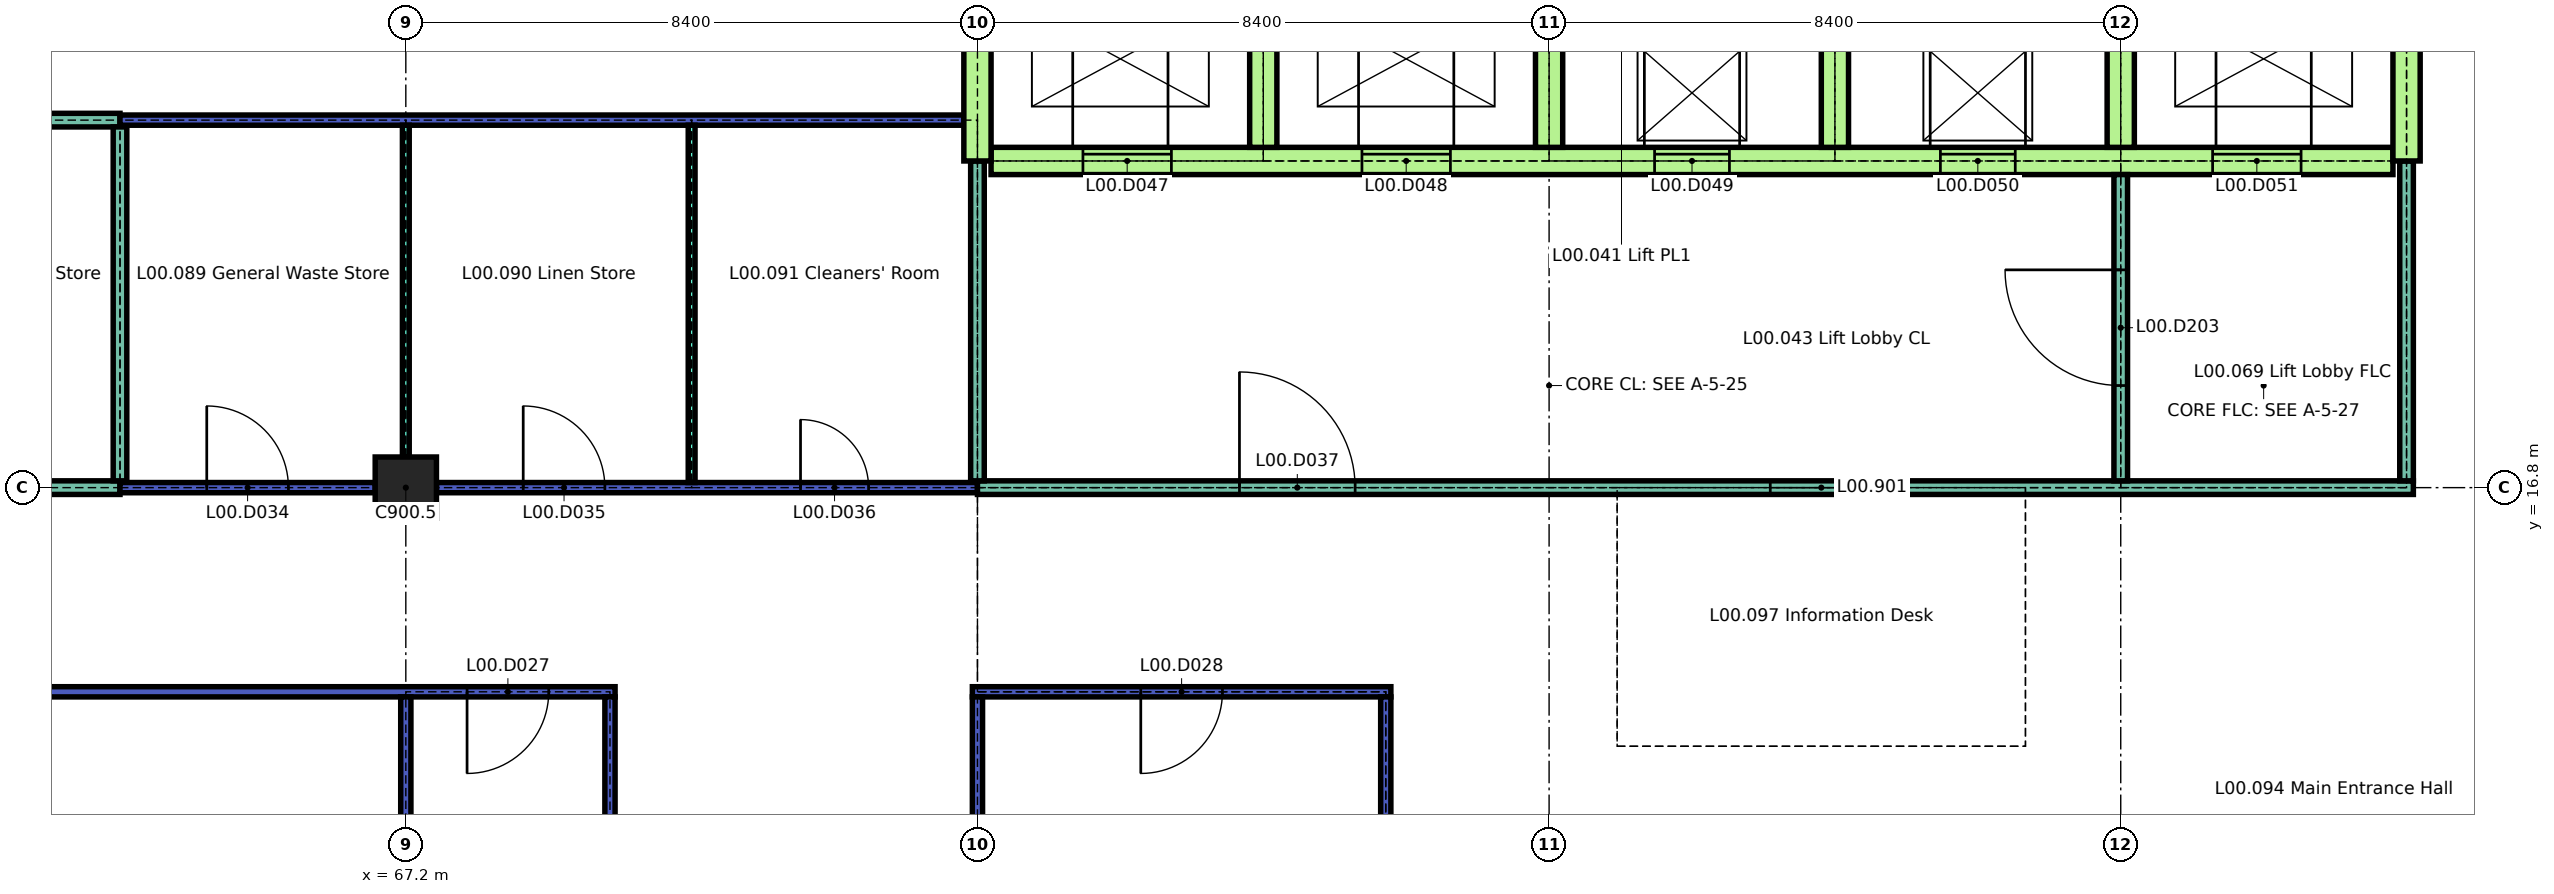
"""IFC4 building model, lengths in metres.
Left out: names, types, materials, properties, quantities, classifications, styles, units other than length and angle.
Written with IfcOpenShell. Run it as: python <this file> out.ifc"""

import sys

from ifc_helpers import new_model, si_unit, direction, frame, frame_2d, origin, origin_2d, place, context, subcontext, project, spatial, rectangle, extrude, element, fill, save


model = new_model("IFC4")
c1 = context("Model", 3, precision=1e-05, world=origin(), true_north=direction((0.0, 1.0)))
c2 = subcontext(c1, "Body", "Model", "MODEL_VIEW")
j1 = project(units=[si_unit("LENGTHUNIT", "METRE"), si_unit("PLANEANGLEUNIT", "RADIAN")], contexts=[c1])
p1 = place(None, origin())
s1 = spatial("IfcSite", under=j1, at=p1, CompositionType="ELEMENT")
p2 = place(p1, origin())
s2 = spatial("IfcBuilding", under=s1, at=p2, CompositionType="ELEMENT")
p3 = place(p2, origin())
s3 = spatial("IfcBuildingStorey", under=s2, at=p3, CompositionType="ELEMENT", Elevation=0.0)
p4 = place(p3, frame((67.2, 16.8, 0.0), z_axis=(0.0, 0.0, 1.0), x_axis=(1.0, 0.0, 0.0)))
e1 = element("IfcColumn", 1, at=p4, inside=s3, PredefinedType="COLUMN", context=c2, shape_type="SweptSolid", body=[
    extrude(rectangle(XDim=0.9, YDim=0.9, at=origin_2d()), origin(), (0.0, 0.0, 1.0), 4.14),
])
p5 = place(p3, frame((41.925, 13.8, 0.0), z_axis=(0.0, 0.0, 1.0), x_axis=(1.0, 0.0, 0.0)))
e2 = element("IfcWall", 2, at=p5, inside=s3, PredefinedType="PARTITIONING", context=c2, shape_type="SweptSolid", body=[
    extrude(rectangle(XDim=28.35, YDim=0.15, at=frame_2d((14.175, 0.0))), origin(), (0.0, 0.0, 1.0), 4.14),
])
p6 = place(p5, frame((11.475, 0.0, 0.0)))
e3 = element("IfcOpeningElement", 3, at=p6, cuts=e2, PredefinedType="OPENING", context=c2, shape_type="SweptSolid", body=[
    extrude(rectangle(XDim=2.4, YDim=2.4, at=frame_2d((1.2, 1.2))), frame((0.0, 0.085, 0.0), z_axis=(0.0, -1.0, 0.0), x_axis=(1.0, 0.0, 0.0)), (0.0, 0.0, 1.0), 0.17),
])
p7 = place(p5, frame((26.175, 0.0, 0.0)))
e4 = element("IfcOpeningElement", 4, at=p7, cuts=e2, PredefinedType="OPENING", context=c2, shape_type="SweptSolid", body=[
    extrude(rectangle(XDim=1.2, YDim=2.1, at=frame_2d((0.6, 1.05))), frame((0.0, 0.085, 0.0), z_axis=(0.0, -1.0, 0.0), x_axis=(1.0, 0.0, 0.0)), (0.0, 0.0, 1.0), 0.17),
])
p8 = place(p3, frame((75.525, 13.8, 0.0), z_axis=(0.0, 0.0, 1.0), x_axis=(1.0, 0.0, 0.0)))
e5 = element("IfcWall", 5, at=p8, inside=s3, PredefinedType="PARTITIONING", context=c2, shape_type="SweptSolid", body=[
    extrude(rectangle(XDim=6.15, YDim=0.15, at=frame_2d((3.075, 0.0))), origin(), (0.0, 0.0, 1.0), 4.14),
])
p9 = place(p8, frame((2.475, 0.0, 0.0)))
e6 = element("IfcOpeningElement", 6, at=p9, cuts=e5, PredefinedType="OPENING", context=c2, shape_type="SweptSolid", body=[
    extrude(rectangle(XDim=1.2, YDim=2.1, at=frame_2d((0.6, 1.05))), frame((0.0, 0.085, 0.0), z_axis=(0.0, -1.0, 0.0), x_axis=(1.0, 0.0, 0.0)), (0.0, 0.0, 1.0), 0.17),
])
p10 = place(p3, frame((59.25, 16.8, 0.0), z_axis=(0.0, 0.0, 1.0), x_axis=(1.0, 0.0, 0.0)))
e7 = element("IfcWall", 7, at=p10, inside=s3, PredefinedType="PARTITIONING", context=c2, shape_type="SweptSolid", body=[
    extrude(rectangle(XDim=3.75, YDim=0.2, at=frame_2d((1.875, 0.0))), origin(), (0.0, 0.0, 1.0), 4.14),
])
p11 = place(p10, frame((1.275, 0.0, 0.0)))
e8 = element("IfcOpeningElement", 8, at=p11, cuts=e7, PredefinedType="OPENING", context=c2, shape_type="SweptSolid", body=[
    extrude(rectangle(XDim=1.2, YDim=2.1, at=frame_2d((0.6, 1.05))), frame((0.0, 0.11, 0.0), z_axis=(0.0, -1.0, 0.0), x_axis=(1.0, 0.0, 0.0)), (0.0, 0.0, 1.0), 0.22),
])
p12 = place(p3, frame((63.0, 16.8, 0.0), z_axis=(0.0, 0.0, 1.0), x_axis=(1.0, 0.0, 0.0)))
e9 = element("IfcWall", 9, at=p12, inside=s3, PredefinedType="PARTITIONING", context=c2, shape_type="SweptSolid", body=[
    extrude(rectangle(XDim=3.75, YDim=0.15, at=frame_2d((1.875, 0.0))), origin(), (0.0, 0.0, 1.0), 4.14),
])
p13 = place(p12, frame((1.275, 0.0, 0.0)))
e10 = element("IfcOpeningElement", 10, at=p13, cuts=e9, PredefinedType="OPENING", context=c2, shape_type="SweptSolid", body=[
    extrude(rectangle(XDim=1.2, YDim=2.1, at=frame_2d((0.6, 1.05))), frame((0.0, 0.085, 0.0), z_axis=(0.0, -1.0, 0.0), x_axis=(1.0, 0.0, 0.0)), (0.0, 0.0, 1.0), 0.17),
])
p14 = place(p3, frame((67.65, 16.8, 0.0), z_axis=(0.0, 0.0, 1.0), x_axis=(1.0, 0.0, 0.0)))
e11 = element("IfcWall", 11, at=p14, inside=s3, PredefinedType="PARTITIONING", context=c2, shape_type="SweptSolid", body=[
    extrude(rectangle(XDim=7.95, YDim=0.15, at=frame_2d((3.975, 0.0))), origin(), (0.0, 0.0, 1.0), 4.14),
])
p15 = place(p14, frame((1.275, 0.0, 0.0)))
e12 = element("IfcOpeningElement", 12, at=p15, cuts=e11, PredefinedType="OPENING", context=c2, shape_type="SweptSolid", body=[
    extrude(rectangle(XDim=1.2, YDim=2.1, at=frame_2d((0.6, 1.05))), frame((0.0, 0.085, 0.0), z_axis=(0.0, -1.0, 0.0), x_axis=(1.0, 0.0, 0.0)), (0.0, 0.0, 1.0), 0.17),
])
p16 = place(p14, frame((5.35, 0.0, 0.0)))
e13 = element("IfcOpeningElement", 13, at=p16, cuts=e11, PredefinedType="OPENING", context=c2, shape_type="SweptSolid", body=[
    extrude(rectangle(XDim=1.0, YDim=2.1, at=frame_2d((0.5, 1.05))), frame((0.0, 0.085, 0.0), z_axis=(0.0, -1.0, 0.0), x_axis=(1.0, 0.0, 0.0)), (0.0, 0.0, 1.0), 0.17),
])
p17 = place(p3, frame((75.6, 16.8, 0.0), z_axis=(0.0, 0.0, 1.0), x_axis=(1.0, 0.0, 0.0)))
e14 = element("IfcWall", 14, at=p17, inside=s3, PredefinedType="PARTITIONING", context=c2, shape_type="SweptSolid", body=[
    extrude(rectangle(XDim=21.1, YDim=0.2, at=frame_2d((10.55, 0.0))), origin(), (0.0, 0.0, 1.0), 4.14),
])
p18 = place(p17, frame((3.85, 0.0, 0.0)))
e15 = element("IfcOpeningElement", 15, at=p18, cuts=e14, PredefinedType="OPENING", context=c2, shape_type="SweptSolid", body=[
    extrude(rectangle(XDim=1.7, YDim=2.4, at=frame_2d((0.85, 1.2))), frame((0.0, 0.11, 0.0), z_axis=(0.0, -1.0, 0.0), x_axis=(1.0, 0.0, 0.0)), (0.0, 0.0, 1.0), 0.22),
])
p19 = place(p17, frame((11.65, 0.0, 0.9)))
e16 = element("IfcOpeningElement", 16, at=p19, cuts=e14, PredefinedType="OPENING", context=c2, shape_type="SweptSolid", body=[
    extrude(rectangle(XDim=1.5, YDim=1.0, at=frame_2d((0.75, 0.5))), frame((0.0, 0.11, 0.0), z_axis=(0.0, -1.0, 0.0), x_axis=(1.0, 0.0, 0.0)), (0.0, 0.0, 1.0), 0.22),
])
p20 = place(p3, frame((75.8, 21.6, 0.0), z_axis=(0.0, 0.0, 1.0), x_axis=(1.0, 0.0, 0.0)))
e17 = element("IfcWall", 17, at=p20, inside=s3, PredefinedType="SHEAR", context=c2, shape_type="SweptSolid", body=[
    extrude(rectangle(XDim=20.6, YDim=0.4, at=frame_2d((10.3, 0.0))), origin(), (0.0, 0.0, 1.0), 4.14),
])
p21 = place(p20, frame((1.35, 0.0, 0.0)))
e18 = element("IfcOpeningElement", 18, at=p21, cuts=e17, PredefinedType="OPENING", context=c2, shape_type="SweptSolid", body=[
    extrude(rectangle(XDim=1.3, YDim=2.1, at=frame_2d((0.65, 1.05))), frame((0.0, 0.21, 0.0), z_axis=(0.0, -1.0, 0.0), x_axis=(1.0, 0.0, 0.0)), (0.0, 0.0, 1.0), 0.42),
])
p22 = place(p20, frame((5.45, 0.0, 0.0)))
e19 = element("IfcOpeningElement", 19, at=p22, cuts=e17, PredefinedType="OPENING", context=c2, shape_type="SweptSolid", body=[
    extrude(rectangle(XDim=1.3, YDim=2.1, at=frame_2d((0.65, 1.05))), frame((0.0, 0.21, 0.0), z_axis=(0.0, -1.0, 0.0), x_axis=(1.0, 0.0, 0.0)), (0.0, 0.0, 1.0), 0.42),
])
p23 = place(p20, frame((9.75, 0.0, 0.0)))
e20 = element("IfcOpeningElement", 20, at=p23, cuts=e17, PredefinedType="OPENING", context=c2, shape_type="SweptSolid", body=[
    extrude(rectangle(XDim=1.1, YDim=2.1, at=frame_2d((0.55, 1.05))), frame((0.0, 0.21, 0.0), z_axis=(0.0, -1.0, 0.0), x_axis=(1.0, 0.0, 0.0)), (0.0, 0.0, 1.0), 0.42),
])
p24 = place(p20, frame((13.95, 0.0, 0.0)))
e21 = element("IfcOpeningElement", 21, at=p24, cuts=e17, PredefinedType="OPENING", context=c2, shape_type="SweptSolid", body=[
    extrude(rectangle(XDim=1.1, YDim=2.1, at=frame_2d((0.55, 1.05))), frame((0.0, 0.21, 0.0), z_axis=(0.0, -1.0, 0.0), x_axis=(1.0, 0.0, 0.0)), (0.0, 0.0, 1.0), 0.42),
])
p25 = place(p20, frame((17.95, 0.0, 0.0)))
e22 = element("IfcOpeningElement", 22, at=p25, cuts=e17, PredefinedType="OPENING", context=c2, shape_type="SweptSolid", body=[
    extrude(rectangle(XDim=1.3, YDim=2.1, at=frame_2d((0.65, 1.05))), frame((0.0, 0.21, 0.0), z_axis=(0.0, -1.0, 0.0), x_axis=(1.0, 0.0, 0.0)), (0.0, 0.0, 1.0), 0.42),
])
p26 = place(p3, frame((58.8, 22.2, 0.0), z_axis=(0.0, 0.0, 1.0), x_axis=(1.0, 0.0, 0.0)))
e23 = element("IfcWall", 23, at=p26, inside=s3, PredefinedType="PARTITIONING", context=c2, shape_type="SweptSolid", body=[
    extrude(rectangle(XDim=4.2, YDim=0.2, at=frame_2d((2.1, 0.0))), origin(), (0.0, 0.0, 1.0), 4.14),
])
p27 = place(p3, frame((63.0, 22.2, 0.0), z_axis=(0.0, 0.0, 1.0), x_axis=(1.0, 0.0, 0.0)))
e24 = element("IfcWall", 24, at=p27, inside=s3, PredefinedType="PARTITIONING", context=c2, shape_type="SweptSolid", body=[
    extrude(rectangle(XDim=12.4, YDim=0.15, at=frame_2d((6.2, 0.0))), origin(), (0.0, 0.0, 1.0), 4.14),
])
p28 = place(p3, frame((63.0, 16.9, 0.0), z_axis=(0.0, 0.0, 1.0), x_axis=(0.0, 1.0, 0.0)))
e25 = element("IfcWall", 25, at=p28, inside=s3, PredefinedType="PARTITIONING", context=c2, shape_type="SweptSolid", body=[
    extrude(rectangle(XDim=5.2, YDim=0.2, at=frame_2d((2.6, 0.0))), origin(), (0.0, 0.0, 1.0), 4.14),
])
p29 = place(p3, frame((67.2, 8.4, 0.0), z_axis=(0.0, 0.0, 1.0), x_axis=(0.0, 1.0, 0.0)))
e26 = element("IfcWall", 26, at=p29, inside=s3, PredefinedType="PARTITIONING", context=c2, shape_type="SweptSolid", body=[
    extrude(rectangle(XDim=5.325, YDim=0.15, at=frame_2d((2.663, 0.0))), origin(), (0.0, 0.0, 1.0), 4.14),
])
p30 = place(p3, frame((67.2, 17.25, 0.0), z_axis=(0.0, 0.0, 1.0), x_axis=(0.0, 1.0, 0.0)))
e27 = element("IfcWall", 27, at=p30, inside=s3, PredefinedType="PARTITIONING", context=c2, shape_type="SweptSolid", body=[
    extrude(rectangle(XDim=4.875, YDim=0.1, at=frame_2d((2.438, 0.0))), origin(), (0.0, 0.0, 1.0), 4.14),
])
p31 = place(p3, frame((70.2, 8.5, 0.0), z_axis=(0.0, 0.0, 1.0), x_axis=(0.0, 1.0, 0.0)))
e28 = element("IfcWall", 28, at=p31, inside=s3, PredefinedType="PARTITIONING", context=c2, shape_type="SweptSolid", body=[
    extrude(rectangle(XDim=5.225, YDim=0.15, at=frame_2d((2.613, 0.0))), origin(), (0.0, 0.0, 1.0), 4.14),
])
p32 = place(p3, frame((71.4, 16.875, 0.0), z_axis=(0.0, 0.0, 1.0), x_axis=(0.0, 1.0, 0.0)))
e29 = element("IfcWall", 29, at=p32, inside=s3, PredefinedType="PARTITIONING", context=c2, shape_type="SweptSolid", body=[
    extrude(rectangle(XDim=5.25, YDim=0.1, at=frame_2d((2.625, 0.0))), origin(), (0.0, 0.0, 1.0), 4.14),
])
p33 = place(p3, frame((75.6, 10.2, 0.0), z_axis=(0.0, 0.0, 1.0), x_axis=(0.0, 1.0, 0.0)))
e30 = element("IfcWall", 30, at=p33, inside=s3, PredefinedType="PARTITIONING", context=c2, shape_type="SweptSolid", body=[
    extrude(rectangle(XDim=3.525, YDim=0.15, at=frame_2d((1.763, 0.0))), origin(), (0.0, 0.0, 1.0), 4.14),
])
p34 = place(p3, frame((75.6, 16.9, 0.0), z_axis=(0.0, 0.0, 1.0), x_axis=(0.0, 1.0, 0.0)))
e31 = element("IfcWall", 31, at=p34, inside=s3, PredefinedType="PARTITIONING", context=c2, shape_type="SweptSolid", body=[
    extrude(rectangle(XDim=4.7, YDim=0.2, at=frame_2d((2.35, 0.0))), origin(), (0.0, 0.0, 1.0), 4.14),
])
p35 = place(p3, frame((75.6, 21.6, 0.0), z_axis=(0.0, 0.0, 1.0), x_axis=(0.0, 1.0, 0.0)))
e32 = element("IfcWall", 32, at=p35, inside=s3, PredefinedType="SHEAR", context=c2, shape_type="SweptSolid", body=[
    extrude(rectangle(XDim=3.4, YDim=0.4, at=frame_2d((1.7, 0.0))), origin(), (0.0, 0.0, 1.0), 4.14),
])
p36 = place(p3, frame((79.8, 21.8, 0.0), z_axis=(0.0, 0.0, 1.0), x_axis=(0.0, 1.0, 0.0)))
e33 = element("IfcWall", 33, at=p36, inside=s3, PredefinedType="SHEAR", context=c2, shape_type="SweptSolid", body=[
    extrude(rectangle(XDim=3.2, YDim=0.4, at=frame_2d((1.6, 0.0))), origin(), (0.0, 0.0, 1.0), 4.14),
])
p37 = place(p3, frame((81.6, 10.2, 0.0), z_axis=(0.0, 0.0, 1.0), x_axis=(0.0, 1.0, 0.0)))
e34 = element("IfcWall", 34, at=p37, inside=s3, PredefinedType="PARTITIONING", context=c2, shape_type="SweptSolid", body=[
    extrude(rectangle(XDim=3.525, YDim=0.15, at=frame_2d((1.763, 0.0))), origin(), (0.0, 0.0, 1.0), 4.14),
])
for number, where, z_axis, x_axis in (
    (35, (84.0, 21.8, 0.0), (0.0, 0.0, 1.0), (0.0, 1.0, 0.0)),
    (36, (88.2, 21.8, 0.0), (0.0, 0.0, 1.0), (0.0, 1.0, 0.0)),
):
    element("IfcWall", number, at=place(p3, frame(where, z_axis=z_axis, x_axis=x_axis)), inside=s3, PredefinedType="SHEAR", context=c2, shape_type="SweptSolid", body=[
        extrude(rectangle(XDim=3.2, YDim=0.4, at=frame_2d((1.6, 0.0))), origin(), (0.0, 0.0, 1.0), 4.14),
    ])
p38 = place(p3, frame((92.4, 16.9, 0.0), z_axis=(0.0, 0.0, 1.0), x_axis=(0.0, 1.0, 0.0)))
e37 = element("IfcWall", 37, at=p38, inside=s3, PredefinedType="PARTITIONING", context=c2, shape_type="SweptSolid", body=[
    extrude(rectangle(XDim=4.5, YDim=0.2, at=frame_2d((2.25, 0.0))), origin(), (0.0, 0.0, 1.0), 4.14),
])
p39 = place(p38, frame((1.4, 0.0, 0.0)))
e38 = element("IfcOpeningElement", 38, at=p39, cuts=e37, PredefinedType="OPENING", context=c2, shape_type="SweptSolid", body=[
    extrude(rectangle(XDim=1.7, YDim=2.4, at=frame_2d((0.85, 1.2))), frame((0.0, 0.11, 0.0), z_axis=(0.0, -1.0, 0.0), x_axis=(1.0, 0.0, 0.0)), (0.0, 0.0, 1.0), 0.22),
])
p40 = place(p3, frame((92.4, 21.8, 0.0), z_axis=(0.0, 0.0, 1.0), x_axis=(0.0, 1.0, 0.0)))
e39 = element("IfcWall", 39, at=p40, inside=s3, PredefinedType="SHEAR", context=c2, shape_type="SweptSolid", body=[
    extrude(rectangle(XDim=3.2, YDim=0.4, at=frame_2d((1.6, 0.0))), origin(), (0.0, 0.0, 1.0), 4.14),
])
p41 = place(p3, frame((96.6, 16.9, 0.0), z_axis=(0.0, 0.0, 1.0), x_axis=(0.0, 1.0, 0.0)))
e40 = element("IfcWall", 40, at=p41, inside=s3, PredefinedType="PARTITIONING", context=c2, shape_type="SweptSolid", body=[
    extrude(rectangle(XDim=4.7, YDim=0.2, at=frame_2d((2.35, 0.0))), origin(), (0.0, 0.0, 1.0), 4.14),
])
p42 = place(p3, frame((96.6, 21.6, 0.0), z_axis=(0.0, 0.0, 1.0), x_axis=(0.0, 1.0, 0.0)))
e41 = element("IfcWall", 41, at=p42, inside=s3, PredefinedType="SHEAR", context=c2, shape_type="SweptSolid", body=[
    extrude(rectangle(XDim=3.4, YDim=0.4, at=frame_2d((1.7, 0.0))), origin(), (0.0, 0.0, 1.0), 4.14),
])
p43 = place(p7, origin())
e42 = element("IfcDoor", 42, at=p43, inside=s3, OperationType="SINGLE_SWING_LEFT", PredefinedType="DOOR", context=c2, shape_type="SweptSolid", body=[
    extrude(rectangle(XDim=1.2, YDim=2.1, at=frame_2d((0.6, 1.05))), frame((0.0, 0.025, 0.0), z_axis=(0.0, -1.0, 0.0), x_axis=(1.0, 0.0, 0.0)), (0.0, 0.0, 1.0), 0.05),
])
fill(e4, e42)
p44 = place(p9, origin())
e43 = element("IfcDoor", 43, at=p44, inside=s3, OperationType="SINGLE_SWING_LEFT", PredefinedType="DOOR", context=c2, shape_type="SweptSolid", body=[
    extrude(rectangle(XDim=1.2, YDim=2.1, at=frame_2d((0.6, 1.05))), frame((0.0, 0.025, 0.0), z_axis=(0.0, -1.0, 0.0), x_axis=(1.0, 0.0, 0.0)), (0.0, 0.0, 1.0), 0.05),
])
fill(e6, e43)
p45 = place(p13, origin())
e44 = element("IfcDoor", 44, at=p45, inside=s3, OperationType="SINGLE_SWING_RIGHT", PredefinedType="DOOR", context=c2, shape_type="SweptSolid", body=[
    extrude(rectangle(XDim=1.2, YDim=2.1, at=frame_2d((0.6, 1.05))), frame((0.0, 0.025, 0.0), z_axis=(0.0, -1.0, 0.0), x_axis=(1.0, 0.0, 0.0)), (0.0, 0.0, 1.0), 0.05),
])
fill(e10, e44)
p46 = place(p15, origin())
e45 = element("IfcDoor", 45, at=p46, inside=s3, OperationType="SINGLE_SWING_RIGHT", PredefinedType="DOOR", context=c2, shape_type="SweptSolid", body=[
    extrude(rectangle(XDim=1.2, YDim=2.1, at=frame_2d((0.6, 1.05))), frame((0.0, 0.025, 0.0), z_axis=(0.0, -1.0, 0.0), x_axis=(1.0, 0.0, 0.0)), (0.0, 0.0, 1.0), 0.05),
])
fill(e12, e45)
p47 = place(p16, origin())
e46 = element("IfcDoor", 46, at=p47, inside=s3, OperationType="SINGLE_SWING_RIGHT", PredefinedType="DOOR", context=c2, shape_type="SweptSolid", body=[
    extrude(rectangle(XDim=1.0, YDim=2.1, at=frame_2d((0.5, 1.05))), frame((0.0, 0.025, 0.0), z_axis=(0.0, -1.0, 0.0), x_axis=(1.0, 0.0, 0.0)), (0.0, 0.0, 1.0), 0.05),
])
fill(e13, e46)
p48 = place(p18, origin())
e47 = element("IfcDoor", 47, at=p48, inside=s3, OperationType="SINGLE_SWING_RIGHT", PredefinedType="DOOR", context=c2, shape_type="SweptSolid", body=[
    extrude(rectangle(XDim=1.7, YDim=2.4, at=frame_2d((0.85, 1.2))), frame((0.0, 0.025, 0.0), z_axis=(0.0, -1.0, 0.0), x_axis=(1.0, 0.0, 0.0)), (0.0, 0.0, 1.0), 0.05),
])
fill(e15, e47)
p49 = place(p21, origin())
e48 = element("IfcDoor", 48, at=p49, inside=s3, OperationType="SLIDING_TO_LEFT", PredefinedType="DOOR", context=c2, shape_type="SweptSolid", body=[
    extrude(rectangle(XDim=1.3, YDim=2.1, at=frame_2d((0.65, 1.05))), frame((0.0, 0.025, 0.0), z_axis=(0.0, -1.0, 0.0), x_axis=(1.0, 0.0, 0.0)), (0.0, 0.0, 1.0), 0.05),
])
fill(e18, e48)
p50 = place(p22, origin())
e49 = element("IfcDoor", 49, at=p50, inside=s3, OperationType="SLIDING_TO_LEFT", PredefinedType="DOOR", context=c2, shape_type="SweptSolid", body=[
    extrude(rectangle(XDim=1.3, YDim=2.1, at=frame_2d((0.65, 1.05))), frame((0.0, 0.025, 0.0), z_axis=(0.0, -1.0, 0.0), x_axis=(1.0, 0.0, 0.0)), (0.0, 0.0, 1.0), 0.05),
])
fill(e19, e49)
p51 = place(p23, origin())
e50 = element("IfcDoor", 50, at=p51, inside=s3, OperationType="SLIDING_TO_LEFT", PredefinedType="DOOR", context=c2, shape_type="SweptSolid", body=[
    extrude(rectangle(XDim=1.1, YDim=2.1, at=frame_2d((0.55, 1.05))), frame((0.0, 0.025, 0.0), z_axis=(0.0, -1.0, 0.0), x_axis=(1.0, 0.0, 0.0)), (0.0, 0.0, 1.0), 0.05),
])
fill(e20, e50)
p52 = place(p24, origin())
e51 = element("IfcDoor", 51, at=p52, inside=s3, OperationType="SLIDING_TO_LEFT", PredefinedType="DOOR", context=c2, shape_type="SweptSolid", body=[
    extrude(rectangle(XDim=1.1, YDim=2.1, at=frame_2d((0.55, 1.05))), frame((0.0, 0.025, 0.0), z_axis=(0.0, -1.0, 0.0), x_axis=(1.0, 0.0, 0.0)), (0.0, 0.0, 1.0), 0.05),
])
fill(e21, e51)
p53 = place(p25, origin())
e52 = element("IfcDoor", 52, at=p53, inside=s3, OperationType="SLIDING_TO_LEFT", PredefinedType="DOOR", context=c2, shape_type="SweptSolid", body=[
    extrude(rectangle(XDim=1.3, YDim=2.1, at=frame_2d((0.65, 1.05))), frame((0.0, 0.025, 0.0), z_axis=(0.0, -1.0, 0.0), x_axis=(1.0, 0.0, 0.0)), (0.0, 0.0, 1.0), 0.05),
])
fill(e22, e52)
p54 = place(p39, origin())
e53 = element("IfcDoor", 53, at=p54, inside=s3, OperationType="SINGLE_SWING_LEFT", PredefinedType="DOOR", context=c2, shape_type="SweptSolid", body=[
    extrude(rectangle(XDim=1.7, YDim=2.4, at=frame_2d((0.85, 1.2))), frame((0.0, 0.025, 0.0), z_axis=(0.0, -1.0, 0.0), x_axis=(1.0, 0.0, 0.0)), (0.0, 0.0, 1.0), 0.05),
])
fill(e38, e53)
p55 = place(p19, origin())
e54 = element("IfcWindow", 54, at=p55, inside=s3, PartitioningType="DOUBLE_PANEL_HORIZONTAL", PredefinedType="WINDOW", context=c2, shape_type="SweptSolid", body=[
    extrude(rectangle(XDim=1.5, YDim=1.0, at=frame_2d((0.75, 0.5))), frame((0.0, 0.025, 0.0), z_axis=(0.0, -1.0, 0.0), x_axis=(1.0, 0.0, 0.0)), (0.0, 0.0, 1.0), 0.05),
])
fill(e16, e54)
save(model, sys.argv[1])
